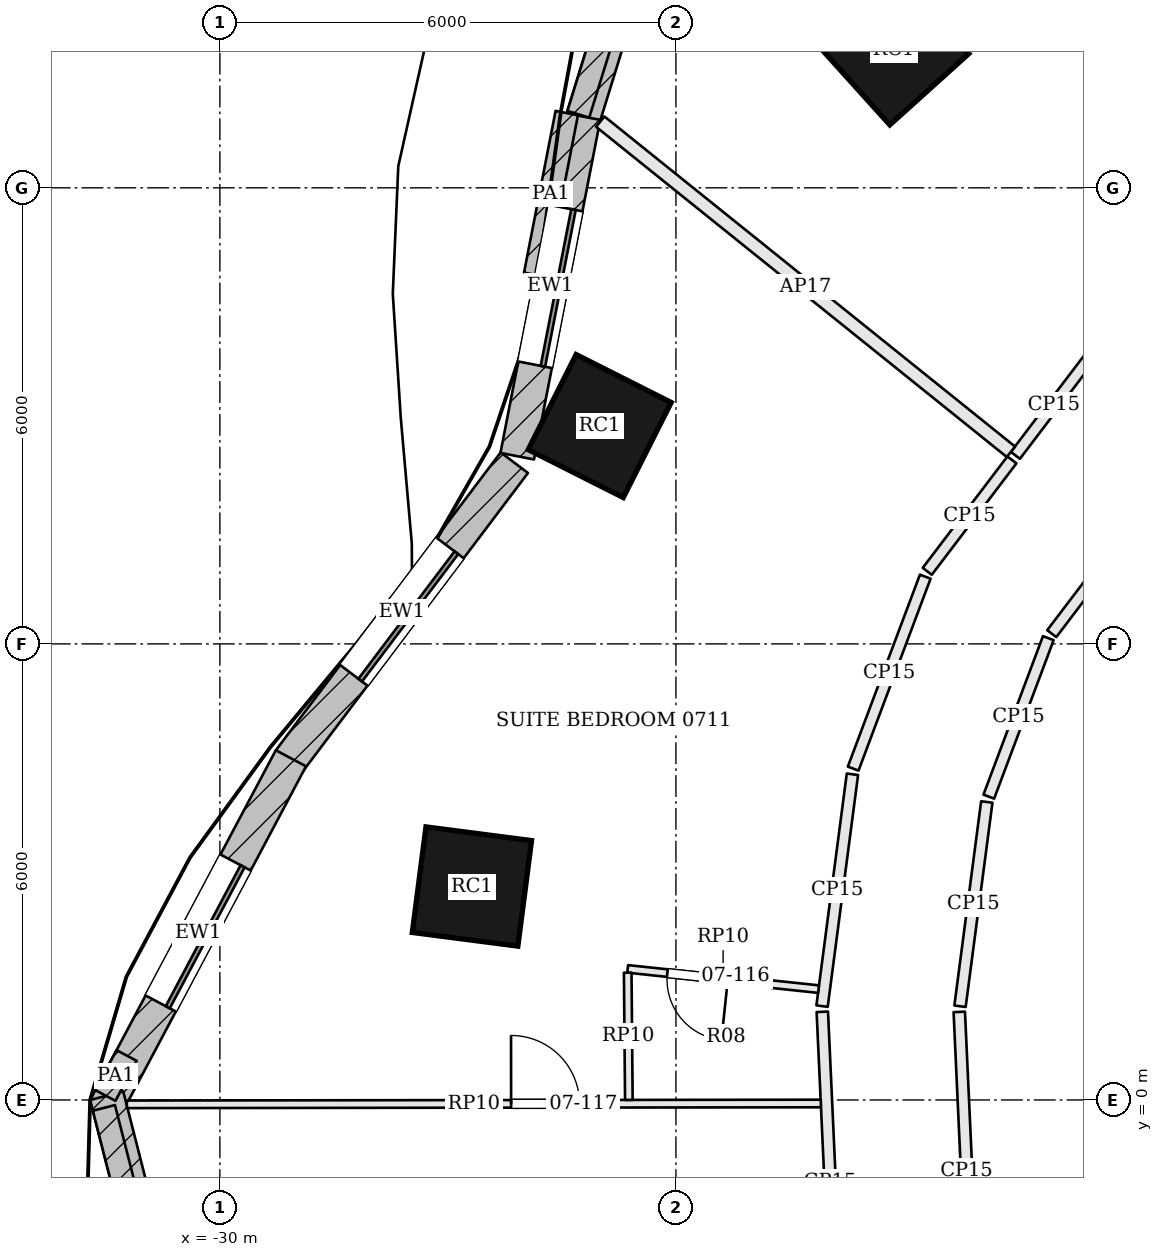
"""IFC4 building model, lengths in metres.
Left out: names, types, materials, properties, quantities, classifications, styles, units other than length and angle.
Written with IfcOpenShell. Run it as: python <this file> out.ifc"""

import sys

from ifc_helpers import new_model, si_unit, direction, frame, frame_2d, origin, origin_2d, place, context, subcontext, project, spatial, rectangle, extrude, element, fill, save


model = new_model("IFC4")
c1 = context("Model", 3, precision=1e-05, world=origin(), true_north=direction((0.0, 1.0)))
c2 = subcontext(c1, "Body", "Model", "MODEL_VIEW")
j1 = project(units=[si_unit("LENGTHUNIT", "METRE"), si_unit("PLANEANGLEUNIT", "RADIAN")], contexts=[c1])
p1 = place(None, origin())
s1 = spatial("IfcSite", under=j1, at=p1, CompositionType="ELEMENT")
p2 = place(p1, origin())
s2 = spatial("IfcBuilding", under=s1, at=p2, CompositionType="ELEMENT")
p3 = place(p2, frame((0.0, 0.0, 41.1)))
s3 = spatial("IfcBuildingStorey", under=s2, at=p3, CompositionType="ELEMENT", Elevation=41.1)
for number, where, z_axis, x_axis in (
    (1, (-21.135, 13.817, 0.0), (0.0, 0.0, 1.0), (-0.743, -0.67, 0.0)),
    (2, (-25.003, 8.866, 0.0), (0.0, 0.0, 1.0), (-0.45, -0.893, 0.0)),
    (3, (-26.684, 2.808, 0.0), (0.0, 0.0, 1.0), (-0.128, -0.992, 0.0)),
):
    element("IfcColumn", number, at=place(p3, frame(where, z_axis=z_axis, x_axis=x_axis)), inside=s3, PredefinedType="COLUMN", context=c2, shape_type="SweptSolid", body=[
        extrude(rectangle(XDim=1.4, YDim=1.4, at=origin_2d()), origin(), (0.0, 0.0, 1.0), 3.6),
    ])
p4 = place(p3, frame((-23.834, 17.402, 0.0), z_axis=(0.0, 0.0, 1.0), x_axis=(-0.2954658114, -0.955353313855, 0.0)))
e4 = element("IfcWall", 4, at=p4, inside=s3, PredefinedType="SOLIDWALL", context=c2, shape_type="SweptSolid", body=[
    extrude(rectangle(XDim=4.698, YDim=0.45, at=frame_2d((2.349, 0.0))), origin(), (0.0, 0.0, 1.0), 3.4),
])
p5 = place(p4, frame((1.299, 0.0, 0.9)))
e5 = element("IfcOpeningElement", 5, at=p5, cuts=e4, PredefinedType="OPENING", context=c2, shape_type="SweptSolid", body=[
    extrude(rectangle(XDim=2.1, YDim=2.0, at=frame_2d((1.05, 1.0))), frame((0.0, 0.235, 0.0), z_axis=(0.0, -1.0, 0.0), x_axis=(1.0, 0.0, 0.0)), (0.0, 0.0, 1.0), 0.47),
])
p6 = place(p3, frame((-25.216, 12.936, 0.0), z_axis=(0.0, 0.0, 1.0), x_axis=(-0.191564556994, -0.981480015336, 0.0)))
e6 = element("IfcWall", 6, at=p6, inside=s3, PredefinedType="SOLIDWALL", context=c2, shape_type="SweptSolid", body=[
    extrude(rectangle(XDim=4.551, YDim=0.45, at=frame_2d((2.275, 0.0))), origin(), (0.0, 0.0, 1.0), 3.4),
])
p7 = place(p6, frame((1.226, 0.0, 0.9)))
e7 = element("IfcOpeningElement", 7, at=p7, cuts=e6, PredefinedType="OPENING", context=c2, shape_type="SweptSolid", body=[
    extrude(rectangle(XDim=2.1, YDim=2.0, at=frame_2d((1.05, 1.0))), frame((0.0, 0.235, 0.0), z_axis=(0.0, -1.0, 0.0), x_axis=(1.0, 0.0, 0.0)), (0.0, 0.0, 1.0), 0.47),
])
p8 = place(p3, frame((-26.126, 8.384, 0.0), z_axis=(0.0, 0.0, 1.0), x_axis=(-0.602408101465, -0.798188248028, 0.0)))
e8 = element("IfcWall", 8, at=p8, inside=s3, PredefinedType="SOLIDWALL", context=c2, shape_type="SweptSolid", body=[
    extrude(rectangle(XDim=4.909, YDim=0.45, at=frame_2d((2.455, 0.0))), origin(), (0.0, 0.0, 1.0), 3.4),
])
p9 = place(p8, frame((1.405, 0.0, 0.9)))
e9 = element("IfcOpeningElement", 9, at=p9, cuts=e8, PredefinedType="OPENING", context=c2, shape_type="SweptSolid", body=[
    extrude(rectangle(XDim=2.1, YDim=2.0, at=frame_2d((1.05, 1.0))), frame((0.0, 0.235, 0.0), z_axis=(0.0, -1.0, 0.0), x_axis=(1.0, 0.0, 0.0)), (0.0, 0.0, 1.0), 0.47),
])
p10 = place(p3, frame((-29.065, 4.495, 0.0), z_axis=(0.0, 0.0, 1.0), x_axis=(-0.469010051546, -0.883192828067, 0.0)))
e10 = element("IfcWall", 10, at=p10, inside=s3, PredefinedType="SOLIDWALL", context=c2, shape_type="SweptSolid", body=[
    extrude(rectangle(XDim=5.206, YDim=0.45, at=frame_2d((2.603, 0.0))), origin(), (0.0, 0.0, 1.0), 3.4),
])
p11 = place(p10, frame((1.553, 0.0, 0.9)))
e11 = element("IfcOpeningElement", 11, at=p11, cuts=e10, PredefinedType="OPENING", context=c2, shape_type="SweptSolid", body=[
    extrude(rectangle(XDim=2.1, YDim=2.0, at=frame_2d((1.05, 1.0))), frame((0.0, 0.235, 0.0), z_axis=(0.0, -1.0, 0.0), x_axis=(1.0, 0.0, 0.0)), (0.0, 0.0, 1.0), 0.47),
])
p12 = place(p3, frame((-31.489, 0.056, 0.0), z_axis=(0.0, 0.0, 1.0), x_axis=(0.247283399528, -0.968943197674, 0.0)))
e12 = element("IfcWall", 12, at=p12, inside=s3, PredefinedType="SOLIDWALL", context=c2, shape_type="SweptSolid", body=[
    extrude(rectangle(XDim=4.982, YDim=0.45, at=frame_2d((2.491, 0.0))), origin(), (0.0, 0.0, 1.0), 3.4),
])
p13 = place(p12, frame((1.441, 0.0, 0.9)))
e13 = element("IfcOpeningElement", 13, at=p13, cuts=e12, PredefinedType="OPENING", context=c2, shape_type="SweptSolid", body=[
    extrude(rectangle(XDim=2.1, YDim=2.0, at=frame_2d((1.05, 1.0))), frame((0.0, 0.235, 0.0), z_axis=(0.0, -1.0, 0.0), x_axis=(1.0, 0.0, 0.0)), (0.0, 0.0, 1.0), 0.47),
])
p14 = place(p3, frame((-23.945, 17.296, 3.6), z_axis=(0.0, 0.0, 1.0), x_axis=(-0.29546008929, -0.955355083535, 0.0)))
e14 = element("IfcWall", 14, at=p14, inside=s3, PredefinedType="PARAPET", context=c2, shape_type="SweptSolid", body=[
    extrude(rectangle(XDim=4.531, YDim=0.3, at=frame_2d((2.265, 0.0))), origin(), (0.0, 0.0, 1.0), 1.1),
])
p15 = place(p3, frame((-25.436, 12.983, 3.6), z_axis=(0.0, 0.0, 1.0), x_axis=(-0.191565926717, -0.981479747993, 0.0)))
e15 = element("IfcWall", 15, at=p15, inside=s3, PredefinedType="PARAPET", context=c2, shape_type="SweptSolid", body=[
    extrude(rectangle(XDim=2.168, YDim=0.3, at=frame_2d((1.084, 0.0))), origin(), (0.0, 0.0, 1.0), 1.1),
])
p16 = place(p3, frame((-31.227, 0.585, 3.6), z_axis=(0.0, 0.0, 1.0), x_axis=(-0.469205161074, -0.883089189619, 0.0)))
e16 = element("IfcWall", 16, at=p16, inside=s3, PredefinedType="PARAPET", context=c2, shape_type="SweptSolid", body=[
    extrude(rectangle(XDim=0.596, YDim=0.3, at=frame_2d((0.298, 0.0))), origin(), (0.0, 0.0, 1.0), 1.1),
])
p17 = place(p3, frame((-31.526, -0.104, 3.6), z_axis=(0.0, 0.0, 1.0), x_axis=(0.247310993439, -0.96893615503, 0.0)))
e17 = element("IfcWall", 17, at=p17, inside=s3, PredefinedType="PARAPET", context=c2, shape_type="SweptSolid", body=[
    extrude(rectangle(XDim=4.725, YDim=0.3, at=frame_2d((2.362, 0.0))), origin(), (0.0, 0.0, 1.0), 1.1),
])
p18 = place(p3, frame((-19.958, 19.62, 0.0), z_axis=(0.0, 0.0, 1.0), x_axis=(0.505625538269, -0.862753044069, 0.0)))
e18 = element("IfcWall", 18, at=p18, inside=s3, PredefinedType="PARTITIONING", context=c2, shape_type="SweptSolid", body=[
    extrude(rectangle(XDim=8.802, YDim=0.175, at=frame_2d((4.401, 0.0))), origin(), (0.0, 0.0, 1.0), 2.68),
])
p19 = place(p3, frame((-18.523, 9.811, 0.0), z_axis=(0.0, 0.0, 1.0), x_axis=(-0.605012897814, -0.796215670204, 0.0)))
e19 = element("IfcWall", 19, at=p19, inside=s3, PredefinedType="PARTITIONING", context=c2, shape_type="SweptSolid", body=[
    extrude(rectangle(XDim=1.671, YDim=0.15, at=frame_2d((0.836, 0.0))), origin(), (0.0, 0.0, 1.0), 2.68),
])
p20 = place(p3, frame((-24.996, 12.871, 0.0), z_axis=(0.0, 0.0, 1.0), x_axis=(0.779371961482, -0.626561525835, 0.0)))
e20 = element("IfcWall", 20, at=p20, inside=s3, PredefinedType="PARTITIONING", context=c2, shape_type="SweptSolid", body=[
    extrude(rectangle(XDim=6.932, YDim=0.175, at=frame_2d((3.466, 0.0))), origin(), (0.0, 0.0, 1.0), 2.68),
])
p21 = place(p3, frame((-19.58, 8.421, 0.0), z_axis=(0.0, 0.0, 1.0), x_axis=(-0.605079905314, -0.796164749399, 0.0)))
e21 = element("IfcWall", 21, at=p21, inside=s3, PredefinedType="PARTITIONING", context=c2, shape_type="SweptSolid", body=[
    extrude(rectangle(XDim=1.841, YDim=0.15, at=frame_2d((0.92, 0.0))), origin(), (0.0, 0.0, 1.0), 2.68),
])
p22 = place(p3, frame((-20.72, 6.885, 0.0), z_axis=(0.0, 0.0, 1.0), x_axis=(-0.351520142875, -0.936180318717, 0.0)))
e22 = element("IfcWall", 22, at=p22, inside=s3, PredefinedType="PARTITIONING", context=c2, shape_type="SweptSolid", body=[
    extrude(rectangle(XDim=2.698, YDim=0.15, at=frame_2d((1.349, 0.0))), origin(), (0.0, 0.0, 1.0), 2.68),
])
p23 = place(p3, frame((-21.678, 4.285, 0.0), z_axis=(0.0, 0.0, 1.0), x_axis=(-0.129922755307, -0.991524118543, 0.0)))
e23 = element("IfcWall", 23, at=p23, inside=s3, PredefinedType="PARTITIONING", context=c2, shape_type="SweptSolid", body=[
    extrude(rectangle(XDim=3.076, YDim=0.15, at=frame_2d((1.538, 0.0))), origin(), (0.0, 0.0, 1.0), 2.68),
])
p24 = place(p3, frame((-22.074, 1.16, 0.0), z_axis=(0.0, 0.0, 1.0), x_axis=(0.045850326789, -0.998948320752, 0.0)))
e24 = element("IfcWall", 24, at=p24, inside=s3, PredefinedType="PARTITIONING", context=c2, shape_type="SweptSolid", body=[
    extrude(rectangle(XDim=4.478, YDim=0.15, at=frame_2d((2.239, 0.0))), origin(), (0.0, 0.0, 1.0), 2.68),
])
p25 = place(p24, frame((2.343, 0.0, 0.0)))
e25 = element("IfcOpeningElement", 25, at=p25, cuts=e24, PredefinedType="OPENING", context=c2, shape_type="SweptSolid", body=[
    extrude(rectangle(XDim=1.0, YDim=2.1, at=frame_2d((0.5, 1.05))), frame((0.0, 0.085, 0.0), z_axis=(0.0, -1.0, 0.0), x_axis=(1.0, 0.0, 0.0)), (0.0, 0.0, 1.0), 0.17),
])
p26 = place(p3, frame((-20.08, -3.025, 0.0), z_axis=(0.0, 0.0, 1.0), x_axis=(-0.04581750387, 0.998949826738, 0.0)))
e26 = element("IfcWall", 26, at=p26, inside=s3, PredefinedType="PARTITIONING", context=c2, shape_type="SweptSolid", body=[
    extrude(rectangle(XDim=4.188, YDim=0.15, at=frame_2d((2.094, 0.0))), origin(), (0.0, 0.0, 1.0), 2.68),
])
p27 = place(p3, frame((-20.262, 1.233, 0.0), z_axis=(0.0, 0.0, 1.0), x_axis=(0.129897568593, 0.991527418518, 0.0)))
e27 = element("IfcWall", 27, at=p27, inside=s3, PredefinedType="PARTITIONING", context=c2, shape_type="SweptSolid", body=[
    extrude(rectangle(XDim=2.71, YDim=0.15, at=frame_2d((1.355, 0.0))), origin(), (0.0, 0.0, 1.0), 2.68),
])
p28 = place(p3, frame((-19.884, 3.99, 0.0), z_axis=(0.0, 0.0, 1.0), x_axis=(0.351423736928, 0.936216511884, 0.0)))
e28 = element("IfcWall", 28, at=p28, inside=s3, PredefinedType="PARTITIONING", context=c2, shape_type="SweptSolid", body=[
    extrude(rectangle(XDim=2.227, YDim=0.15, at=frame_2d((1.114, 0.0))), origin(), (0.0, 0.0, 1.0), 2.68),
])
p29 = place(p3, frame((-19.056, 6.135, 0.0), z_axis=(0.0, 0.0, 1.0), x_axis=(0.604999774258, 0.796225642107, 0.0)))
e29 = element("IfcWall", 29, at=p29, inside=s3, PredefinedType="PARTITIONING", context=c2, shape_type="SweptSolid", body=[
    extrude(rectangle(XDim=3.04, YDim=0.15, at=frame_2d((1.52, 0.0))), origin(), (0.0, 0.0, 1.0), 2.68),
])
p30 = place(p3, frame((-31.223, -0.057, 0.0), z_axis=(0.0, 0.0, 1.0), x_axis=(0.999999275952, 0.001203368563, 0.0)))
e30 = element("IfcWall", 30, at=p30, inside=s3, PredefinedType="PARTITIONING", context=c2, shape_type="SweptSolid", body=[
    extrude(rectangle(XDim=9.13, YDim=0.1, at=frame_2d((4.565, 0.0))), origin(), (0.0, 0.0, 1.0), 2.68),
])
p31 = place(p30, frame((5.055, 0.0, 0.0)))
e31 = element("IfcOpeningElement", 31, at=p31, cuts=e30, PredefinedType="OPENING", context=c2, shape_type="SweptSolid", body=[
    extrude(rectangle(XDim=0.9, YDim=2.4, at=frame_2d((0.45, 1.2))), frame((0.0, 0.06, 0.0), z_axis=(0.0, -1.0, 0.0), x_axis=(1.0, 0.0, 0.0)), (0.0, 0.0, 1.0), 0.12),
])
p32 = place(p3, frame((-22.124, 1.458, 0.0), z_axis=(0.0, 0.0, 1.0), x_axis=(-0.994442232467, 0.105283646817, 0.0)))
e32 = element("IfcWall", 32, at=p32, inside=s3, PredefinedType="PARTITIONING", context=c2, shape_type="SweptSolid", body=[
    extrude(rectangle(XDim=2.525, YDim=0.1, at=frame_2d((1.263, 0.0))), origin(), (0.0, 0.0, 1.0), 2.68),
])
p33 = place(p32, frame((1.2, 0.0, 0.0)))
e33 = element("IfcOpeningElement", 33, at=p33, cuts=e32, PredefinedType="OPENING", context=c2, shape_type="SweptSolid", body=[
    extrude(rectangle(XDim=0.8, YDim=2.1, at=frame_2d((0.4, 1.05))), frame((0.0, 0.06, 0.0), z_axis=(0.0, -1.0, 0.0), x_axis=(1.0, 0.0, 0.0)), (0.0, 0.0, 1.0), 0.12),
])
p34 = place(p3, frame((-24.635, 1.674, 0.0), z_axis=(0.0, 0.0, 1.0), x_axis=(0.009042804114, -0.999959113011, 0.0)))
e34 = element("IfcWall", 34, at=p34, inside=s3, PredefinedType="PARTITIONING", context=c2, shape_type="SweptSolid", body=[
    extrude(rectangle(XDim=1.674, YDim=0.1, at=frame_2d((0.837, 0.0))), origin(), (0.0, 0.0, 1.0), 2.68),
])
p35 = place(p7, origin())
e35 = element("IfcWindow", 35, at=p35, inside=s3, PartitioningType="SINGLE_PANEL", PredefinedType="WINDOW", context=c2, shape_type="SweptSolid", body=[
    extrude(rectangle(XDim=2.1, YDim=2.0, at=frame_2d((1.05, 1.0))), frame((0.0, 0.135, 0.0), z_axis=(0.0, -1.0, 0.0), x_axis=(1.0, 0.0, 0.0)), (0.0, 0.0, 1.0), 0.06),
])
fill(e7, e35)
p36 = place(p9, origin())
e36 = element("IfcWindow", 36, at=p36, inside=s3, PartitioningType="SINGLE_PANEL", PredefinedType="WINDOW", context=c2, shape_type="SweptSolid", body=[
    extrude(rectangle(XDim=2.1, YDim=2.0, at=frame_2d((1.05, 1.0))), frame((0.0, 0.135, 0.0), z_axis=(0.0, -1.0, 0.0), x_axis=(1.0, 0.0, 0.0)), (0.0, 0.0, 1.0), 0.06),
])
fill(e9, e36)
p37 = place(p11, origin())
e37 = element("IfcWindow", 37, at=p37, inside=s3, PartitioningType="SINGLE_PANEL", PredefinedType="WINDOW", context=c2, shape_type="SweptSolid", body=[
    extrude(rectangle(XDim=2.1, YDim=2.0, at=frame_2d((1.05, 1.0))), frame((0.0, 0.135, 0.0), z_axis=(0.0, -1.0, 0.0), x_axis=(1.0, 0.0, 0.0)), (0.0, 0.0, 1.0), 0.06),
])
fill(e11, e37)
p38 = place(p33, origin())
e38 = element("IfcDoor", 38, at=p38, inside=s3, OperationType="SINGLE_SWING_LEFT", PredefinedType="DOOR", context=c2, shape_type="SweptSolid", body=[
    extrude(rectangle(XDim=0.8, YDim=2.1, at=frame_2d((0.4, 1.05))), frame((0.0, 0.025, 0.0), z_axis=(0.0, -1.0, 0.0), x_axis=(1.0, 0.0, 0.0)), (0.0, 0.0, 1.0), 0.05),
])
fill(e33, e38)
p39 = place(p31, origin())
e39 = element("IfcDoor", 39, at=p39, inside=s3, OperationType="SINGLE_SWING_LEFT", PredefinedType="DOOR", context=c2, shape_type="SweptSolid", body=[
    extrude(rectangle(XDim=0.9, YDim=2.4, at=frame_2d((0.45, 1.2))), frame((0.0, 0.025, 0.0), z_axis=(0.0, -1.0, 0.0), x_axis=(1.0, 0.0, 0.0)), (0.0, 0.0, 1.0), 0.05),
])
fill(e31, e39)
save(model, sys.argv[1])
